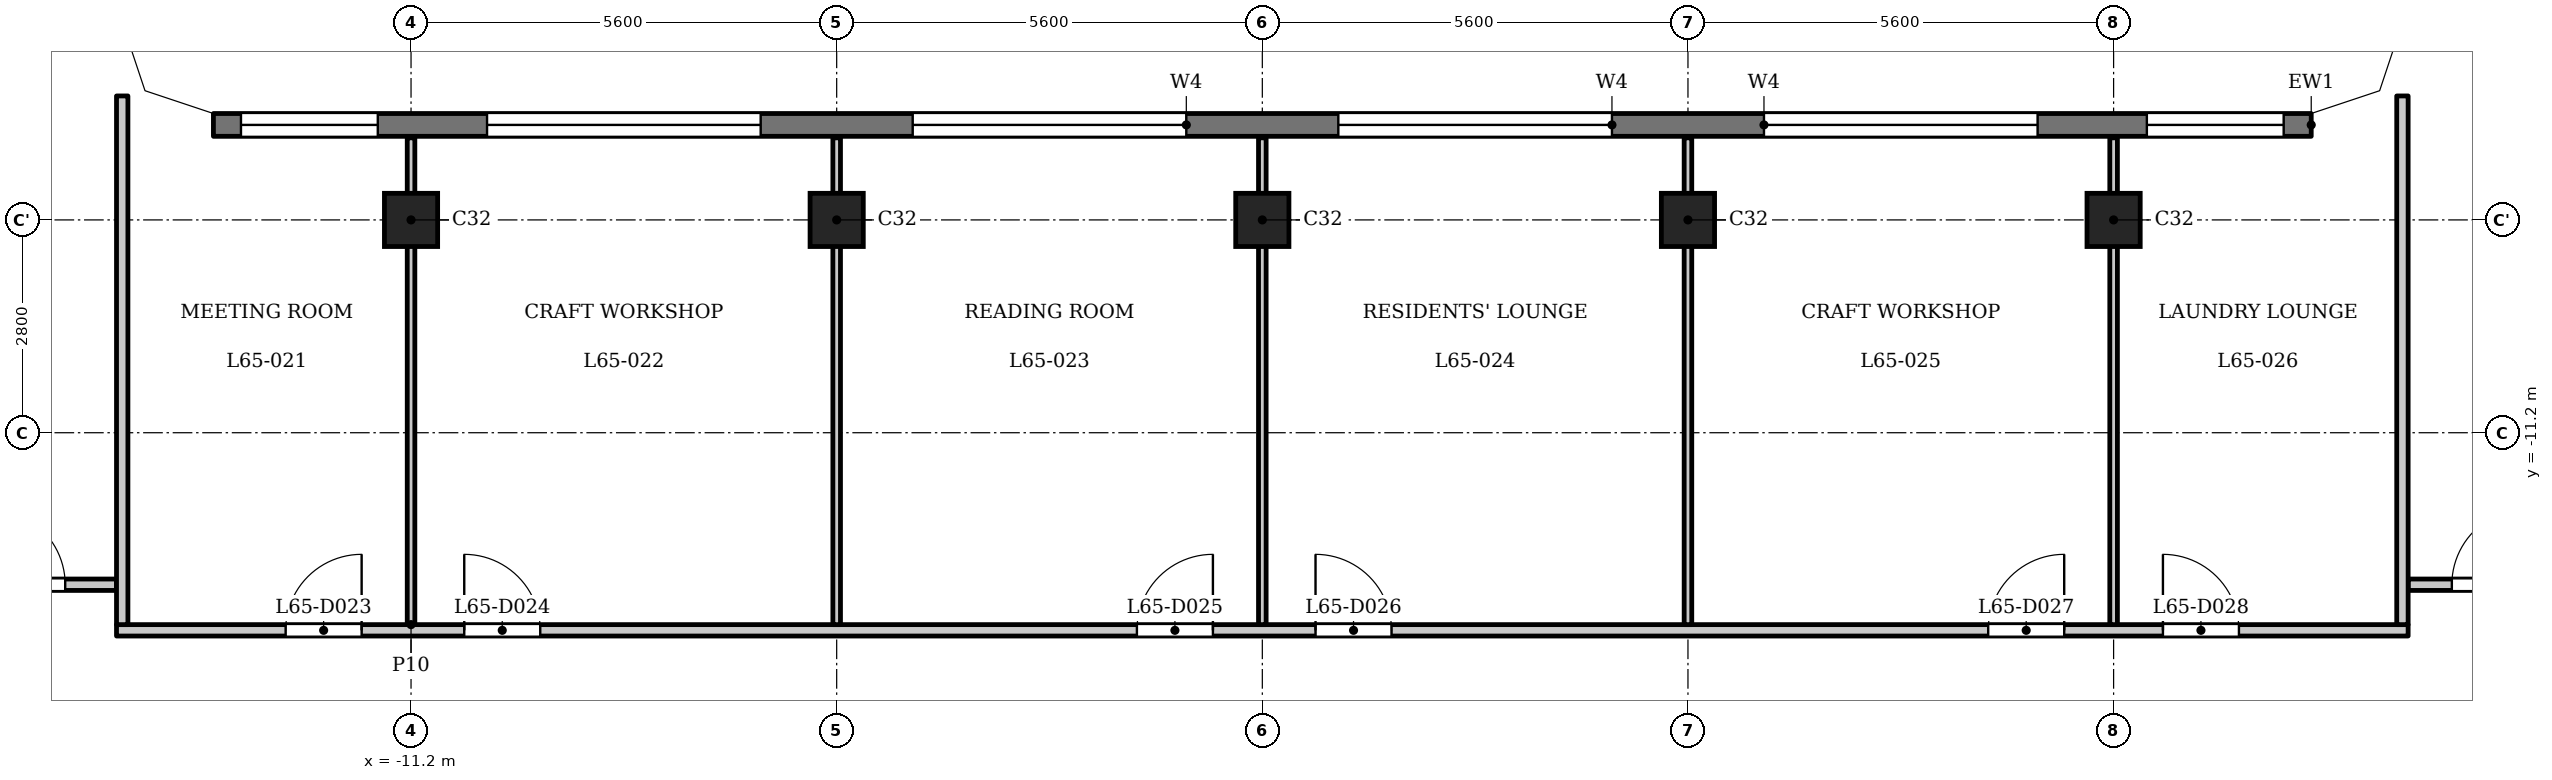
"""IFC4 building model, lengths in metres.
Left out: names, types, materials, properties, quantities, classifications, styles, units other than length and angle.
Written with IfcOpenShell. Run it as: python <this file> out.ifc"""

import sys

from ifc_helpers import new_model, si_unit, direction, frame, frame_2d, origin, origin_2d, place, context, subcontext, project, spatial, polyline, rectangle, outline, extrude, element, fill, save


model = new_model("IFC4")
c1 = context("Model", 3, precision=1e-05, world=origin(), true_north=direction((0.0, 1.0)))
c2 = subcontext(c1, "Body", "Model", "MODEL_VIEW")
j1 = project(units=[si_unit("LENGTHUNIT", "METRE"), si_unit("PLANEANGLEUNIT", "RADIAN")], contexts=[c1])
p1 = place(None, origin())
s1 = spatial("IfcSite", under=j1, at=p1, CompositionType="ELEMENT")
p2 = place(p1, origin())
s2 = spatial("IfcBuilding", under=s1, at=p2, CompositionType="ELEMENT")
p3 = place(p2, frame((0.0, 0.0, 252.2)))
s3 = spatial("IfcBuildingStorey", under=s2, at=p3, CompositionType="ELEMENT", Elevation=252.2)
for number, where, z_axis, x_axis in (
    (1, (-11.2, -8.4, 0.0), (0.0, 0.0, 1.0), (1.0, 0.0, 0.0)),
    (2, (-5.6, -8.4, 0.0), (0.0, 0.0, 1.0), (1.0, 0.0, 0.0)),
    (3, (0.0, -8.4, 0.0), (0.0, 0.0, 1.0), (1.0, 0.0, 0.0)),
    (4, (5.6, -8.4, 0.0), (0.0, 0.0, 1.0), (1.0, 0.0, 0.0)),
    (5, (11.2, -8.4, 0.0), (0.0, 0.0, 1.0), (1.0, 0.0, 0.0)),
):
    element("IfcColumn", number, at=place(p3, frame(where, z_axis=z_axis, x_axis=x_axis)), inside=s3, PredefinedType="COLUMN", context=c2, shape_type="SweptSolid", body=[
        extrude(rectangle(XDim=0.7, YDim=0.7, at=origin_2d()), origin(), (0.0, 0.0, 1.0), 3.5),
    ])
p4 = place(p3, frame((13.8, -7.15, 0.0), z_axis=(0.0, 0.0, 1.0), x_axis=(-1.0, 0.0, 0.0)))
e6 = element("IfcWall", 6, at=p4, inside=s3, PredefinedType="SOLIDWALL", context=c2, shape_type="SweptSolid", body=[
    extrude(rectangle(XDim=27.6, YDim=0.3, at=frame_2d((13.8, 0.0))), origin(), (0.0, 0.0, 1.0), 3.2),
])
p5 = place(p4, frame((0.363, 0.0, 0.9)))
e7 = element("IfcOpeningElement", 7, at=p5, cuts=e6, PredefinedType="OPENING", context=c2, shape_type="SweptSolid", body=[
    extrude(rectangle(XDim=1.8, YDim=1.25, at=frame_2d((0.9, 0.625))), frame((0.0, 0.16, 0.0), z_axis=(0.0, -1.0, 0.0), x_axis=(1.0, 0.0, 0.0)), (0.0, 0.0, 1.0), 0.32),
])
p6 = place(p4, frame((3.6, 0.0, 1.2)))
e8 = element("IfcOpeningElement", 8, at=p6, cuts=e6, PredefinedType="OPENING", context=c2, shape_type="SweptSolid", body=[
    extrude(rectangle(XDim=3.6, YDim=0.95, at=frame_2d((1.8, 0.475))), frame((0.0, 0.16, 0.0), z_axis=(0.0, -1.0, 0.0), x_axis=(1.0, 0.0, 0.0)), (0.0, 0.0, 1.0), 0.32),
])
p7 = place(p4, frame((9.2, 0.0, 1.2)))
e9 = element("IfcOpeningElement", 9, at=p7, cuts=e6, PredefinedType="OPENING", context=c2, shape_type="SweptSolid", body=[
    extrude(rectangle(XDim=3.6, YDim=0.95, at=frame_2d((1.8, 0.475))), frame((0.0, 0.16, 0.0), z_axis=(0.0, -1.0, 0.0), x_axis=(1.0, 0.0, 0.0)), (0.0, 0.0, 1.0), 0.32),
])
p8 = place(p4, frame((14.8, 0.0, 1.2)))
e10 = element("IfcOpeningElement", 10, at=p8, cuts=e6, PredefinedType="OPENING", context=c2, shape_type="SweptSolid", body=[
    extrude(rectangle(XDim=3.6, YDim=0.95, at=frame_2d((1.8, 0.475))), frame((0.0, 0.16, 0.0), z_axis=(0.0, -1.0, 0.0), x_axis=(1.0, 0.0, 0.0)), (0.0, 0.0, 1.0), 0.32),
])
p9 = place(p4, frame((20.4, 0.0, 1.2)))
e11 = element("IfcOpeningElement", 11, at=p9, cuts=e6, PredefinedType="OPENING", context=c2, shape_type="SweptSolid", body=[
    extrude(rectangle(XDim=3.6, YDim=0.95, at=frame_2d((1.8, 0.475))), frame((0.0, 0.16, 0.0), z_axis=(0.0, -1.0, 0.0), x_axis=(1.0, 0.0, 0.0)), (0.0, 0.0, 1.0), 0.32),
])
p10 = place(p4, frame((25.438, 0.0, 0.9)))
e12 = element("IfcOpeningElement", 12, at=p10, cuts=e6, PredefinedType="OPENING", context=c2, shape_type="SweptSolid", body=[
    extrude(rectangle(XDim=1.8, YDim=1.25, at=frame_2d((0.9, 0.625))), frame((0.0, 0.16, 0.0), z_axis=(0.0, -1.0, 0.0), x_axis=(1.0, 0.0, 0.0)), (0.0, 0.0, 1.0), 0.32),
])
p11 = place(p3, frame((-15.075, -13.8, 0.0), z_axis=(0.0, 0.0, 1.0), x_axis=(1.0, 0.0, 0.0)))
e13 = element("IfcWall", 13, at=p11, inside=s3, PredefinedType="PARTITIONING", context=c2, shape_type="SweptSolid", body=[
    extrude(rectangle(XDim=30.15, YDim=0.15, at=frame_2d((15.075, 0.0))), origin(), (0.0, 0.0, 1.0), 3.2),
])
p12 = place(p11, frame((2.225, 0.0, 0.0)))
e14 = element("IfcOpeningElement", 14, at=p12, cuts=e13, PredefinedType="OPENING", context=c2, shape_type="SweptSolid", body=[
    extrude(rectangle(XDim=1.0, YDim=2.1, at=frame_2d((0.5, 1.05))), frame((0.0, 0.085, 0.0), z_axis=(0.0, -1.0, 0.0), x_axis=(1.0, 0.0, 0.0)), (0.0, 0.0, 1.0), 0.17),
])
p13 = place(p11, frame((4.575, 0.0, 0.0)))
e15 = element("IfcOpeningElement", 15, at=p13, cuts=e13, PredefinedType="OPENING", context=c2, shape_type="SweptSolid", body=[
    extrude(rectangle(XDim=1.0, YDim=2.1, at=frame_2d((0.5, 1.05))), frame((0.0, 0.085, 0.0), z_axis=(0.0, -1.0, 0.0), x_axis=(1.0, 0.0, 0.0)), (0.0, 0.0, 1.0), 0.17),
])
p14 = place(p11, frame((13.425, 0.0, 0.0)))
e16 = element("IfcOpeningElement", 16, at=p14, cuts=e13, PredefinedType="OPENING", context=c2, shape_type="SweptSolid", body=[
    extrude(rectangle(XDim=1.0, YDim=2.1, at=frame_2d((0.5, 1.05))), frame((0.0, 0.085, 0.0), z_axis=(0.0, -1.0, 0.0), x_axis=(1.0, 0.0, 0.0)), (0.0, 0.0, 1.0), 0.17),
])
p15 = place(p11, frame((15.775, 0.0, 0.0)))
e17 = element("IfcOpeningElement", 17, at=p15, cuts=e13, PredefinedType="OPENING", context=c2, shape_type="SweptSolid", body=[
    extrude(rectangle(XDim=1.0, YDim=2.1, at=frame_2d((0.5, 1.05))), frame((0.0, 0.085, 0.0), z_axis=(0.0, -1.0, 0.0), x_axis=(1.0, 0.0, 0.0)), (0.0, 0.0, 1.0), 0.17),
])
p16 = place(p11, frame((24.625, 0.0, 0.0)))
e18 = element("IfcOpeningElement", 18, at=p16, cuts=e13, PredefinedType="OPENING", context=c2, shape_type="SweptSolid", body=[
    extrude(rectangle(XDim=1.0, YDim=2.1, at=frame_2d((0.5, 1.05))), frame((0.0, 0.085, 0.0), z_axis=(0.0, -1.0, 0.0), x_axis=(1.0, 0.0, 0.0)), (0.0, 0.0, 1.0), 0.17),
])
p17 = place(p11, frame((26.924, 0.0, 0.0)))
e19 = element("IfcOpeningElement", 19, at=p17, cuts=e13, PredefinedType="OPENING", context=c2, shape_type="SweptSolid", body=[
    extrude(rectangle(XDim=1.0, YDim=2.1, at=frame_2d((0.5, 1.05))), frame((0.0, 0.085, 0.0), z_axis=(0.0, -1.0, 0.0), x_axis=(1.0, 0.0, 0.0)), (0.0, 0.0, 1.0), 0.17),
])
p18 = place(p3, frame((-17.4, -13.2, 0.0), z_axis=(0.0, 0.0, 1.0), x_axis=(1.0, 0.0, 0.0)))
e20 = element("IfcWall", 20, at=p18, inside=s3, PredefinedType="PARTITIONING", context=c2, shape_type="SweptSolid", body=[
    extrude(rectangle(XDim=2.325, YDim=0.15, at=frame_2d((1.163, 0.0))), origin(), (0.0, 0.0, 1.0), 3.2),
])
p19 = place(p18, frame((0.65, 0.0, 0.0)))
e21 = element("IfcOpeningElement", 21, at=p19, cuts=e20, PredefinedType="OPENING", context=c2, shape_type="SweptSolid", body=[
    extrude(rectangle(XDim=1.0, YDim=2.1, at=frame_2d((0.5, 1.05))), frame((0.0, 0.085, 0.0), z_axis=(0.0, -1.0, 0.0), x_axis=(1.0, 0.0, 0.0)), (0.0, 0.0, 1.0), 0.17),
])
p20 = place(p3, frame((15.075, -13.2, 0.0), z_axis=(0.0, 0.0, 1.0), x_axis=(1.0, 0.0, 0.0)))
e22 = element("IfcWall", 22, at=p20, inside=s3, PredefinedType="PARTITIONING", context=c2, shape_type="SweptSolid", body=[
    extrude(rectangle(XDim=2.325, YDim=0.15, at=frame_2d((1.163, 0.0))), origin(), (0.0, 0.0, 1.0), 3.2),
])
p21 = place(p20, frame((0.575, 0.0, 0.0)))
e23 = element("IfcOpeningElement", 23, at=p21, cuts=e22, PredefinedType="OPENING", context=c2, shape_type="SweptSolid", body=[
    extrude(rectangle(XDim=1.0, YDim=2.1, at=frame_2d((0.5, 1.05))), frame((0.0, 0.085, 0.0), z_axis=(0.0, -1.0, 0.0), x_axis=(1.0, 0.0, 0.0)), (0.0, 0.0, 1.0), 0.17),
])
p22 = place(p3, frame((-15.0, -13.725, 0.0), z_axis=(0.0, 0.0, 1.0), x_axis=(0.0, 1.0, 0.0)))
e24 = element("IfcWall", 24, at=p22, inside=s3, PredefinedType="PARTITIONING", context=c2, shape_type="SweptSolid", body=[
    extrude(rectangle(XDim=6.956, YDim=0.15, at=frame_2d((3.478, 0.0))), origin(), (0.0, 0.0, 1.0), 3.2),
])
for number, where, z_axis, x_axis in (
    (25, (-11.2, -13.725, 0.0), (0.0, 0.0, 1.0), (0.0, 1.0, 0.0)),
    (26, (-5.6, -13.725, 0.0), (0.0, 0.0, 1.0), (0.0, 1.0, 0.0)),
    (27, (0.0, -13.725, 0.0), (0.0, 0.0, 1.0), (0.0, 1.0, 0.0)),
    (28, (5.6, -13.725, 0.0), (0.0, 0.0, 1.0), (0.0, 1.0, 0.0)),
    (29, (11.2, -13.725, 0.0), (0.0, 0.0, 1.0), (0.0, 1.0, 0.0)),
):
    element("IfcWall", number, at=place(p3, frame(where, z_axis=z_axis, x_axis=x_axis)), inside=s3, PredefinedType="PARTITIONING", context=c2, shape_type="SweptSolid", body=[
        extrude(rectangle(XDim=6.405, YDim=0.1, at=frame_2d((3.203, 0.0))), origin(), (0.0, 0.0, 1.0), 3.2),
    ])
p23 = place(p3, frame((15.0, -13.725, 0.0), z_axis=(0.0, 0.0, 1.0), x_axis=(0.0, 1.0, 0.0)))
e30 = element("IfcWall", 30, at=p23, inside=s3, PredefinedType="PARTITIONING", context=c2, shape_type="SweptSolid", body=[
    extrude(rectangle(XDim=6.956, YDim=0.15, at=frame_2d((3.478, 0.0))), origin(), (0.0, 0.0, 1.0), 3.2),
])
p24 = place(p3, origin())
e31 = element("IfcWall", 31, at=p24, inside=s3, PredefinedType="SOLIDWALL", context=c2, shape_type="SweptSolid", body=[
    extrude(outline(polyline([(14.937, -6.937), (15.3, -5.849), (15.3, -5.8), (15.0, -5.8), (14.7, -6.7), (13.8, -7.0), (13.8, -7.3), (13.849, -7.3), (14.937, -6.937)])), origin(), (0.0, 0.0, 1.0), 3.2),
])
e32 = element("IfcWall", 32, at=p24, inside=s3, PredefinedType="SOLIDWALL", context=c2, shape_type="SweptSolid", body=[
    extrude(outline(polyline([(-14.937, -6.937), (-13.849, -7.3), (-13.8, -7.3), (-13.8, -7.0), (-14.7, -6.7), (-15.0, -5.8), (-15.3, -5.8), (-15.3, -5.849), (-14.937, -6.937)])), origin(), (0.0, 0.0, 1.0), 3.2),
])
p25 = place(p19, origin())
e33 = element("IfcDoor", 33, at=p25, inside=s3, OperationType="SINGLE_SWING_RIGHT", PredefinedType="DOOR", context=c2, shape_type="SweptSolid", body=[
    extrude(rectangle(XDim=1.0, YDim=2.1, at=frame_2d((0.5, 1.05))), frame((0.0, 0.025, 0.0), z_axis=(0.0, -1.0, 0.0), x_axis=(1.0, 0.0, 0.0)), (0.0, 0.0, 1.0), 0.05),
])
fill(e21, e33)
p26 = place(p21, origin())
e34 = element("IfcDoor", 34, at=p26, inside=s3, OperationType="SINGLE_SWING_LEFT", PredefinedType="DOOR", context=c2, shape_type="SweptSolid", body=[
    extrude(rectangle(XDim=1.0, YDim=2.1, at=frame_2d((0.5, 1.05))), frame((0.0, 0.025, 0.0), z_axis=(0.0, -1.0, 0.0), x_axis=(1.0, 0.0, 0.0)), (0.0, 0.0, 1.0), 0.05),
])
fill(e23, e34)
p27 = place(p12, origin())
e35 = element("IfcDoor", 35, at=p27, inside=s3, OperationType="SINGLE_SWING_LEFT", PredefinedType="DOOR", context=c2, shape_type="SweptSolid", body=[
    extrude(rectangle(XDim=1.0, YDim=2.1, at=frame_2d((0.5, 1.05))), frame((0.0, 0.025, 0.0), z_axis=(0.0, -1.0, 0.0), x_axis=(1.0, 0.0, 0.0)), (0.0, 0.0, 1.0), 0.05),
])
fill(e14, e35)
p28 = place(p13, origin())
e36 = element("IfcDoor", 36, at=p28, inside=s3, OperationType="SINGLE_SWING_RIGHT", PredefinedType="DOOR", context=c2, shape_type="SweptSolid", body=[
    extrude(rectangle(XDim=1.0, YDim=2.1, at=frame_2d((0.5, 1.05))), frame((0.0, 0.025, 0.0), z_axis=(0.0, -1.0, 0.0), x_axis=(1.0, 0.0, 0.0)), (0.0, 0.0, 1.0), 0.05),
])
fill(e15, e36)
p29 = place(p14, origin())
e37 = element("IfcDoor", 37, at=p29, inside=s3, OperationType="SINGLE_SWING_LEFT", PredefinedType="DOOR", context=c2, shape_type="SweptSolid", body=[
    extrude(rectangle(XDim=1.0, YDim=2.1, at=frame_2d((0.5, 1.05))), frame((0.0, 0.025, 0.0), z_axis=(0.0, -1.0, 0.0), x_axis=(1.0, 0.0, 0.0)), (0.0, 0.0, 1.0), 0.05),
])
fill(e16, e37)
p30 = place(p15, origin())
e38 = element("IfcDoor", 38, at=p30, inside=s3, OperationType="SINGLE_SWING_RIGHT", PredefinedType="DOOR", context=c2, shape_type="SweptSolid", body=[
    extrude(rectangle(XDim=1.0, YDim=2.1, at=frame_2d((0.5, 1.05))), frame((0.0, 0.025, 0.0), z_axis=(0.0, -1.0, 0.0), x_axis=(1.0, 0.0, 0.0)), (0.0, 0.0, 1.0), 0.05),
])
fill(e17, e38)
p31 = place(p16, origin())
e39 = element("IfcDoor", 39, at=p31, inside=s3, OperationType="SINGLE_SWING_LEFT", PredefinedType="DOOR", context=c2, shape_type="SweptSolid", body=[
    extrude(rectangle(XDim=1.0, YDim=2.1, at=frame_2d((0.5, 1.05))), frame((0.0, 0.025, 0.0), z_axis=(0.0, -1.0, 0.0), x_axis=(1.0, 0.0, 0.0)), (0.0, 0.0, 1.0), 0.05),
])
fill(e18, e39)
p32 = place(p17, origin())
e40 = element("IfcDoor", 40, at=p32, inside=s3, OperationType="SINGLE_SWING_RIGHT", PredefinedType="DOOR", context=c2, shape_type="SweptSolid", body=[
    extrude(rectangle(XDim=1.0, YDim=2.1, at=frame_2d((0.5, 1.05))), frame((0.0, 0.025, 0.0), z_axis=(0.0, -1.0, 0.0), x_axis=(1.0, 0.0, 0.0)), (0.0, 0.0, 1.0), 0.05),
])
fill(e19, e40)
p33 = place(p5, origin())
e41 = element("IfcWindow", 41, at=p33, inside=s3, PartitioningType="SINGLE_PANEL", PredefinedType="WINDOW", context=c2, shape_type="SweptSolid", body=[
    extrude(rectangle(XDim=1.8, YDim=1.25, at=frame_2d((0.9, 0.625))), frame((0.0, 0.03, 0.0), z_axis=(0.0, -1.0, 0.0), x_axis=(1.0, 0.0, 0.0)), (0.0, 0.0, 1.0), 0.06),
])
fill(e7, e41)
p34 = place(p6, origin())
e42 = element("IfcWindow", 42, at=p34, inside=s3, PartitioningType="SINGLE_PANEL", PredefinedType="WINDOW", context=c2, shape_type="SweptSolid", body=[
    extrude(rectangle(XDim=3.6, YDim=0.95, at=frame_2d((1.8, 0.475))), frame((0.0, 0.03, 0.0), z_axis=(0.0, -1.0, 0.0), x_axis=(1.0, 0.0, 0.0)), (0.0, 0.0, 1.0), 0.06),
])
fill(e8, e42)
p35 = place(p7, origin())
e43 = element("IfcWindow", 43, at=p35, inside=s3, PartitioningType="SINGLE_PANEL", PredefinedType="WINDOW", context=c2, shape_type="SweptSolid", body=[
    extrude(rectangle(XDim=3.6, YDim=0.95, at=frame_2d((1.8, 0.475))), frame((0.0, 0.03, 0.0), z_axis=(0.0, -1.0, 0.0), x_axis=(1.0, 0.0, 0.0)), (0.0, 0.0, 1.0), 0.06),
])
fill(e9, e43)
p36 = place(p8, origin())
e44 = element("IfcWindow", 44, at=p36, inside=s3, PartitioningType="SINGLE_PANEL", PredefinedType="WINDOW", context=c2, shape_type="SweptSolid", body=[
    extrude(rectangle(XDim=3.6, YDim=0.95, at=frame_2d((1.8, 0.475))), frame((0.0, 0.03, 0.0), z_axis=(0.0, -1.0, 0.0), x_axis=(1.0, 0.0, 0.0)), (0.0, 0.0, 1.0), 0.06),
])
fill(e10, e44)
p37 = place(p9, origin())
e45 = element("IfcWindow", 45, at=p37, inside=s3, PartitioningType="SINGLE_PANEL", PredefinedType="WINDOW", context=c2, shape_type="SweptSolid", body=[
    extrude(rectangle(XDim=3.6, YDim=0.95, at=frame_2d((1.8, 0.475))), frame((0.0, 0.03, 0.0), z_axis=(0.0, -1.0, 0.0), x_axis=(1.0, 0.0, 0.0)), (0.0, 0.0, 1.0), 0.06),
])
fill(e11, e45)
p38 = place(p10, origin())
e46 = element("IfcWindow", 46, at=p38, inside=s3, PartitioningType="SINGLE_PANEL", PredefinedType="WINDOW", context=c2, shape_type="SweptSolid", body=[
    extrude(rectangle(XDim=1.8, YDim=1.25, at=frame_2d((0.9, 0.625))), frame((0.0, 0.03, 0.0), z_axis=(0.0, -1.0, 0.0), x_axis=(1.0, 0.0, 0.0)), (0.0, 0.0, 1.0), 0.06),
])
fill(e12, e46)
save(model, sys.argv[1])
